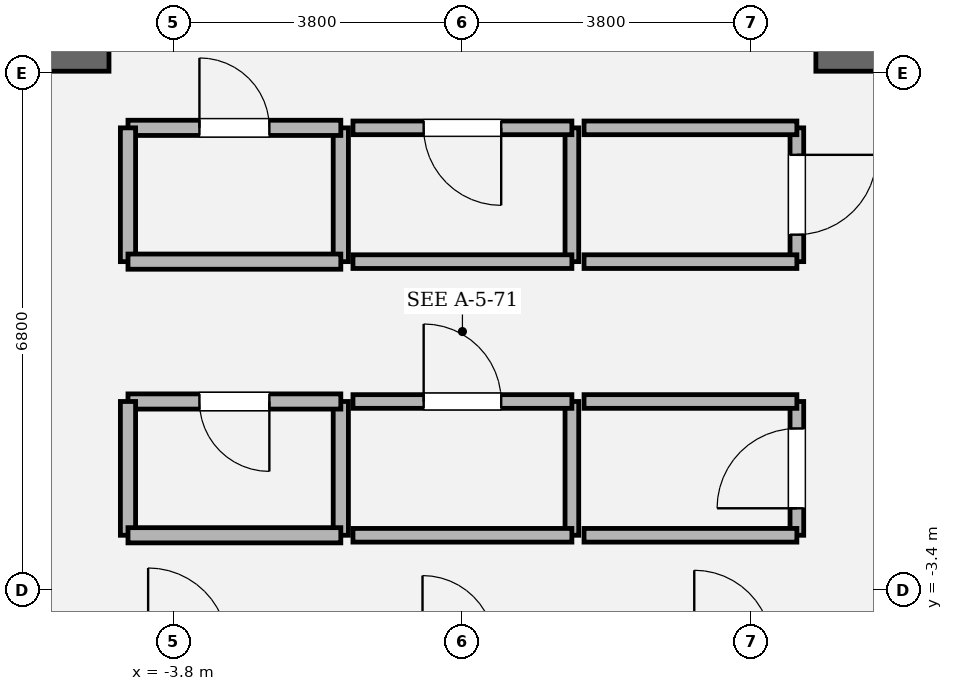
"""IFC4 building model, lengths in metres.
Left out: names, types, materials, properties, quantities, classifications, styles, units other than length and angle.
Written with IfcOpenShell. Run it as: python <this file> out.ifc"""

import sys

from ifc_helpers import new_model, si_unit, direction, frame, frame_2d, origin, place, context, subcontext, project, spatial, rectangle, extrude, element, fill, save


model = new_model("IFC4")
c1 = context("Model", 3, precision=1e-05, world=origin(), true_north=direction((0.0, 1.0)))
c2 = subcontext(c1, "Body", "Model", "MODEL_VIEW")
j1 = project(units=[si_unit("LENGTHUNIT", "METRE"), si_unit("PLANEANGLEUNIT", "RADIAN")], contexts=[c1])
p1 = place(None, origin())
s1 = spatial("IfcSite", under=j1, at=p1, CompositionType="ELEMENT")
p2 = place(p1, origin())
s2 = spatial("IfcBuilding", under=s1, at=p2, CompositionType="ELEMENT")
p3 = place(p2, frame((0.0, 0.0, 339.0)))
s3 = spatial("IfcBuildingStorey", under=s2, at=p3, CompositionType="ELEMENT", Elevation=339.0)
for number, where, z_axis, x_axis in (
    (1, (-9.975, 3.6, 0.0), (0.0, 0.0, 1.0), (1.0, 0.0, 0.0)),
    (2, (4.65, 3.6, 0.0), (0.0, 0.0, 1.0), (1.0, 0.0, 0.0)),
):
    element("IfcWall", number, at=place(p3, frame(where, z_axis=z_axis, x_axis=x_axis)), inside=s3, PredefinedType="SOLIDWALL", context=c2, shape_type="SweptSolid", body=[
        extrude(rectangle(XDim=5.325, YDim=0.35, at=frame_2d((2.663, 0.0))), origin(), (0.0, 0.0, 1.0), 4.8),
    ])
p4 = place(p3, frame((-1.6, -2.68, 0.0), z_axis=(0.0, 0.0, 1.0), x_axis=(0.0, 1.0, 0.0)))
e3 = element("IfcWall", 3, at=p4, inside=s3, PredefinedType="SOLIDWALL", context=c2, shape_type="SweptSolid", body=[
    extrude(rectangle(XDim=1.76, YDim=0.2, at=frame_2d((0.88, 0.0))), origin(), (0.0, 0.0, 1.0), 4.52),
])
p5 = place(p3, frame((-1.6, -0.92, 0.0), z_axis=(0.0, 0.0, 1.0), x_axis=(-1.0, 0.0, 0.0)))
e4 = element("IfcWall", 4, at=p5, inside=s3, PredefinedType="SOLIDWALL", context=c2, shape_type="SweptSolid", body=[
    extrude(rectangle(XDim=2.8, YDim=0.2, at=frame_2d((1.4, 0.0))), origin(), (0.0, 0.0, 1.0), 4.52),
])
p6 = place(p5, frame((0.94, 0.0, 0.0)))
e5 = element("IfcOpeningElement", 5, at=p6, cuts=e4, PredefinedType="OPENING", context=c2, shape_type="SweptSolid", body=[
    extrude(rectangle(XDim=0.92, YDim=2.1, at=frame_2d((0.46, 1.05))), frame((0.0, 0.11, 0.0), z_axis=(0.0, -1.0, 0.0), x_axis=(1.0, 0.0, 0.0)), (0.0, 0.0, 1.0), 0.22),
])
p7 = place(p3, frame((-4.4, -0.92, 0.0), z_axis=(0.0, 0.0, 1.0), x_axis=(0.0, -1.0, 0.0)))
e6 = element("IfcWall", 6, at=p7, inside=s3, PredefinedType="SOLIDWALL", context=c2, shape_type="SweptSolid", body=[
    extrude(rectangle(XDim=1.76, YDim=0.2, at=frame_2d((0.88, 0.0))), origin(), (0.0, 0.0, 1.0), 4.52),
])
p8 = place(p3, frame((-4.4, -2.68, 0.0), z_axis=(0.0, 0.0, 1.0), x_axis=(1.0, 0.0, 0.0)))
e7 = element("IfcWall", 7, at=p8, inside=s3, PredefinedType="SOLIDWALL", context=c2, shape_type="SweptSolid", body=[
    extrude(rectangle(XDim=2.8, YDim=0.2, at=frame_2d((1.4, 0.0))), origin(), (0.0, 0.0, 1.0), 4.52),
])
p9 = place(p3, frame((1.44, -2.68, 0.0), z_axis=(0.0, 0.0, 1.0), x_axis=(0.0, 1.0, 0.0)))
e8 = element("IfcWall", 8, at=p9, inside=s3, PredefinedType="PARTITIONING", context=c2, shape_type="SweptSolid", body=[
    extrude(rectangle(XDim=1.76, YDim=0.18, at=frame_2d((0.88, 0.0))), origin(), (0.0, 0.0, 1.0), 4.52),
])
p10 = place(p3, frame((1.44, -0.92, 0.0), z_axis=(0.0, 0.0, 1.0), x_axis=(-1.0, 0.0, 0.0)))
e9 = element("IfcWall", 9, at=p10, inside=s3, PredefinedType="PARTITIONING", context=c2, shape_type="SweptSolid", body=[
    extrude(rectangle(XDim=2.88, YDim=0.18, at=frame_2d((1.44, 0.0))), origin(), (0.0, 0.0, 1.0), 4.52),
])
p11 = place(p10, frame((0.93, 0.0, 0.0)))
e10 = element("IfcOpeningElement", 10, at=p11, cuts=e9, PredefinedType="OPENING", context=c2, shape_type="SweptSolid", body=[
    extrude(rectangle(XDim=1.02, YDim=2.2, at=frame_2d((0.51, 1.1))), frame((0.0, 0.1, 0.0), z_axis=(0.0, -1.0, 0.0), x_axis=(1.0, 0.0, 0.0)), (0.0, 0.0, 1.0), 0.2),
])
p12 = place(p3, frame((-1.44, -2.68, 0.0), z_axis=(0.0, 0.0, 1.0), x_axis=(1.0, 0.0, 0.0)))
e11 = element("IfcWall", 11, at=p12, inside=s3, PredefinedType="PARTITIONING", context=c2, shape_type="SweptSolid", body=[
    extrude(rectangle(XDim=2.88, YDim=0.18, at=frame_2d((1.44, 0.0))), origin(), (0.0, 0.0, 1.0), 4.52),
])
p13 = place(p3, frame((4.4, -2.68, 0.0), z_axis=(0.0, 0.0, 1.0), x_axis=(0.0, 1.0, 0.0)))
e12 = element("IfcWall", 12, at=p13, inside=s3, PredefinedType="PARTITIONING", context=c2, shape_type="SweptSolid", body=[
    extrude(rectangle(XDim=1.76, YDim=0.18, at=frame_2d((0.88, 0.0))), origin(), (0.0, 0.0, 1.0), 4.52),
])
p14 = place(p13, frame((0.355, 0.0, 0.0)))
e13 = element("IfcOpeningElement", 13, at=p14, cuts=e12, PredefinedType="OPENING", context=c2, shape_type="SweptSolid", body=[
    extrude(rectangle(XDim=1.05, YDim=2.2, at=frame_2d((0.525, 1.1))), frame((0.0, 0.1, 0.0), z_axis=(0.0, -1.0, 0.0), x_axis=(1.0, 0.0, 0.0)), (0.0, 0.0, 1.0), 0.2),
])
for number, where, z_axis, x_axis in (
    (14, (4.4, -0.92, 0.0), (0.0, 0.0, 1.0), (-1.0, 0.0, 0.0)),
    (15, (1.6, -2.68, 0.0), (0.0, 0.0, 1.0), (1.0, 0.0, 0.0)),
):
    element("IfcWall", number, at=place(p3, frame(where, z_axis=z_axis, x_axis=x_axis)), inside=s3, PredefinedType="PARTITIONING", context=c2, shape_type="SweptSolid", body=[
        extrude(rectangle(XDim=2.8, YDim=0.18, at=frame_2d((1.4, 0.0))), origin(), (0.0, 0.0, 1.0), 4.52),
    ])
p15 = place(p3, frame((-1.6, 0.92, 0.0), z_axis=(0.0, 0.0, 1.0), x_axis=(0.0, 1.0, 0.0)))
e16 = element("IfcWall", 16, at=p15, inside=s3, PredefinedType="SOLIDWALL", context=c2, shape_type="SweptSolid", body=[
    extrude(rectangle(XDim=1.76, YDim=0.2, at=frame_2d((0.88, 0.0))), origin(), (0.0, 0.0, 1.0), 4.52),
])
p16 = place(p3, frame((-1.6, 2.68, 0.0), z_axis=(0.0, 0.0, 1.0), x_axis=(-1.0, 0.0, 0.0)))
e17 = element("IfcWall", 17, at=p16, inside=s3, PredefinedType="SOLIDWALL", context=c2, shape_type="SweptSolid", body=[
    extrude(rectangle(XDim=2.8, YDim=0.2, at=frame_2d((1.4, 0.0))), origin(), (0.0, 0.0, 1.0), 4.52),
])
p17 = place(p16, frame((0.94, 0.0, 0.0)))
e18 = element("IfcOpeningElement", 18, at=p17, cuts=e17, PredefinedType="OPENING", context=c2, shape_type="SweptSolid", body=[
    extrude(rectangle(XDim=0.92, YDim=2.1, at=frame_2d((0.46, 1.05))), frame((0.0, 0.11, 0.0), z_axis=(0.0, -1.0, 0.0), x_axis=(1.0, 0.0, 0.0)), (0.0, 0.0, 1.0), 0.22),
])
p18 = place(p3, frame((-4.4, 2.68, 0.0), z_axis=(0.0, 0.0, 1.0), x_axis=(0.0, -1.0, 0.0)))
e19 = element("IfcWall", 19, at=p18, inside=s3, PredefinedType="SOLIDWALL", context=c2, shape_type="SweptSolid", body=[
    extrude(rectangle(XDim=1.76, YDim=0.2, at=frame_2d((0.88, 0.0))), origin(), (0.0, 0.0, 1.0), 4.52),
])
p19 = place(p3, frame((-4.4, 0.92, 0.0), z_axis=(0.0, 0.0, 1.0), x_axis=(1.0, 0.0, 0.0)))
e20 = element("IfcWall", 20, at=p19, inside=s3, PredefinedType="SOLIDWALL", context=c2, shape_type="SweptSolid", body=[
    extrude(rectangle(XDim=2.8, YDim=0.2, at=frame_2d((1.4, 0.0))), origin(), (0.0, 0.0, 1.0), 4.52),
])
p20 = place(p3, frame((1.44, 0.92, 0.0), z_axis=(0.0, 0.0, 1.0), x_axis=(0.0, 1.0, 0.0)))
e21 = element("IfcWall", 21, at=p20, inside=s3, PredefinedType="PARTITIONING", context=c2, shape_type="SweptSolid", body=[
    extrude(rectangle(XDim=1.76, YDim=0.18, at=frame_2d((0.88, 0.0))), origin(), (0.0, 0.0, 1.0), 4.52),
])
p21 = place(p3, frame((1.44, 2.68, 0.0), z_axis=(0.0, 0.0, 1.0), x_axis=(-1.0, 0.0, 0.0)))
e22 = element("IfcWall", 22, at=p21, inside=s3, PredefinedType="PARTITIONING", context=c2, shape_type="SweptSolid", body=[
    extrude(rectangle(XDim=2.88, YDim=0.18, at=frame_2d((1.44, 0.0))), origin(), (0.0, 0.0, 1.0), 4.52),
])
p22 = place(p21, frame((0.93, 0.0, 0.0)))
e23 = element("IfcOpeningElement", 23, at=p22, cuts=e22, PredefinedType="OPENING", context=c2, shape_type="SweptSolid", body=[
    extrude(rectangle(XDim=1.02, YDim=2.2, at=frame_2d((0.51, 1.1))), frame((0.0, 0.1, 0.0), z_axis=(0.0, -1.0, 0.0), x_axis=(1.0, 0.0, 0.0)), (0.0, 0.0, 1.0), 0.2),
])
p23 = place(p3, frame((-1.44, 0.92, 0.0), z_axis=(0.0, 0.0, 1.0), x_axis=(1.0, 0.0, 0.0)))
e24 = element("IfcWall", 24, at=p23, inside=s3, PredefinedType="PARTITIONING", context=c2, shape_type="SweptSolid", body=[
    extrude(rectangle(XDim=2.88, YDim=0.18, at=frame_2d((1.44, 0.0))), origin(), (0.0, 0.0, 1.0), 4.52),
])
p24 = place(p3, frame((4.4, 0.92, 0.0), z_axis=(0.0, 0.0, 1.0), x_axis=(0.0, 1.0, 0.0)))
e25 = element("IfcWall", 25, at=p24, inside=s3, PredefinedType="PARTITIONING", context=c2, shape_type="SweptSolid", body=[
    extrude(rectangle(XDim=1.76, YDim=0.18, at=frame_2d((0.88, 0.0))), origin(), (0.0, 0.0, 1.0), 4.52),
])
p25 = place(p24, frame((0.355, 0.0, 0.0)))
e26 = element("IfcOpeningElement", 26, at=p25, cuts=e25, PredefinedType="OPENING", context=c2, shape_type="SweptSolid", body=[
    extrude(rectangle(XDim=1.05, YDim=2.2, at=frame_2d((0.525, 1.1))), frame((0.0, 0.1, 0.0), z_axis=(0.0, -1.0, 0.0), x_axis=(1.0, 0.0, 0.0)), (0.0, 0.0, 1.0), 0.2),
])
for number, where, z_axis, x_axis in (
    (27, (4.4, 2.68, 0.0), (0.0, 0.0, 1.0), (-1.0, 0.0, 0.0)),
    (28, (1.6, 0.92, 0.0), (0.0, 0.0, 1.0), (1.0, 0.0, 0.0)),
):
    element("IfcWall", number, at=place(p3, frame(where, z_axis=z_axis, x_axis=x_axis)), inside=s3, PredefinedType="PARTITIONING", context=c2, shape_type="SweptSolid", body=[
        extrude(rectangle(XDim=2.8, YDim=0.18, at=frame_2d((1.4, 0.0))), origin(), (0.0, 0.0, 1.0), 4.52),
    ])
p26 = place(p6, origin())
e29 = element("IfcDoor", 29, at=p26, inside=s3, OperationType="SINGLE_SWING_LEFT", PredefinedType="DOOR", context=c2, shape_type="SweptSolid", body=[
    extrude(rectangle(XDim=0.92, YDim=2.1, at=frame_2d((0.46, 1.05))), frame((0.0, 0.025, 0.0), z_axis=(0.0, -1.0, 0.0), x_axis=(1.0, 0.0, 0.0)), (0.0, 0.0, 1.0), 0.05),
])
fill(e5, e29)
p27 = place(p11, origin())
e30 = element("IfcDoor", 30, at=p27, inside=s3, OperationType="SINGLE_SWING_RIGHT", PredefinedType="DOOR", context=c2, shape_type="SweptSolid", body=[
    extrude(rectangle(XDim=1.02, YDim=2.2, at=frame_2d((0.51, 1.1))), frame((0.0, 0.025, 0.0), z_axis=(0.0, -1.0, 0.0), x_axis=(1.0, 0.0, 0.0)), (0.0, 0.0, 1.0), 0.05),
])
fill(e10, e30)
p28 = place(p14, origin())
e31 = element("IfcDoor", 31, at=p28, inside=s3, OperationType="SINGLE_SWING_LEFT", PredefinedType="DOOR", context=c2, shape_type="SweptSolid", body=[
    extrude(rectangle(XDim=1.05, YDim=2.2, at=frame_2d((0.525, 1.1))), frame((0.0, 0.025, 0.0), z_axis=(0.0, -1.0, 0.0), x_axis=(1.0, 0.0, 0.0)), (0.0, 0.0, 1.0), 0.05),
])
fill(e13, e31)
p29 = place(p17, origin())
e32 = element("IfcDoor", 32, at=p29, inside=s3, OperationType="SINGLE_SWING_RIGHT", PredefinedType="DOOR", context=c2, shape_type="SweptSolid", body=[
    extrude(rectangle(XDim=0.92, YDim=2.1, at=frame_2d((0.46, 1.05))), frame((0.0, 0.025, 0.0), z_axis=(0.0, -1.0, 0.0), x_axis=(1.0, 0.0, 0.0)), (0.0, 0.0, 1.0), 0.05),
])
fill(e18, e32)
p30 = place(p22, origin())
e33 = element("IfcDoor", 33, at=p30, inside=s3, OperationType="SINGLE_SWING_LEFT", PredefinedType="DOOR", context=c2, shape_type="SweptSolid", body=[
    extrude(rectangle(XDim=1.02, YDim=2.2, at=frame_2d((0.51, 1.1))), frame((0.0, 0.025, 0.0), z_axis=(0.0, -1.0, 0.0), x_axis=(1.0, 0.0, 0.0)), (0.0, 0.0, 1.0), 0.05),
])
fill(e23, e33)
p31 = place(p25, origin())
e34 = element("IfcDoor", 34, at=p31, inside=s3, OperationType="SINGLE_SWING_RIGHT", PredefinedType="DOOR", context=c2, shape_type="SweptSolid", body=[
    extrude(rectangle(XDim=1.05, YDim=2.2, at=frame_2d((0.525, 1.1))), frame((0.0, 0.025, 0.0), z_axis=(0.0, -1.0, 0.0), x_axis=(1.0, 0.0, 0.0)), (0.0, 0.0, 1.0), 0.05),
])
fill(e26, e34)
save(model, sys.argv[1])
